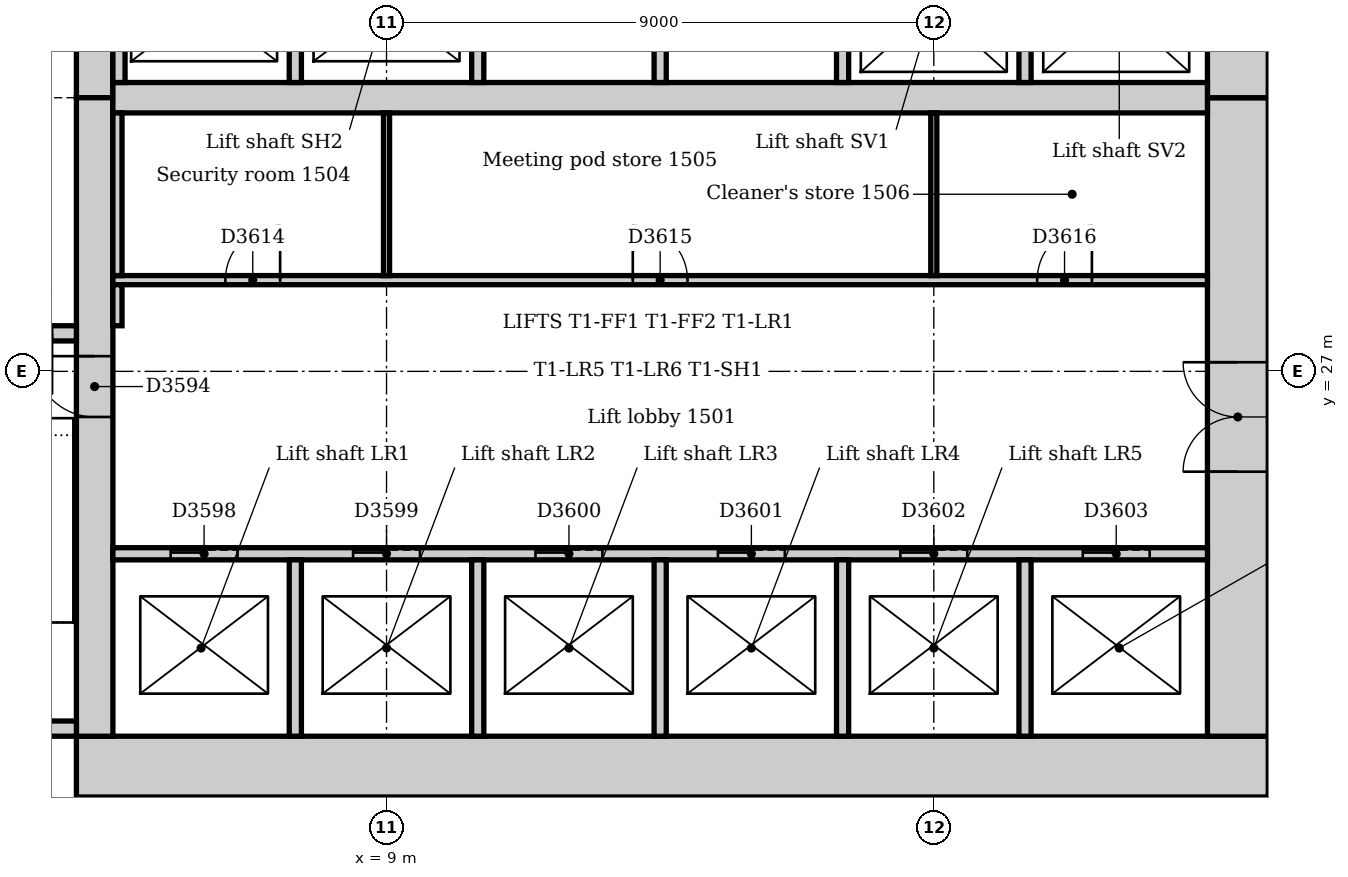
"""IFC4 building model, lengths in metres.
Left out: names, types, materials, properties, quantities, classifications, styles, units other than length and angle.
Written with IfcOpenShell. Run it as: python <this file> out.ifc"""

import sys

from ifc_helpers import new_model, si_unit, direction, frame, frame_2d, origin, place, context, subcontext, project, spatial, rectangle, extrude, element, fill, save


model = new_model("IFC4")
c1 = context("Model", 3, precision=1e-05, world=origin(), true_north=direction((0.0, 1.0)))
c2 = subcontext(c1, "Body", "Model", "MODEL_VIEW")
j1 = project(units=[si_unit("LENGTHUNIT", "METRE"), si_unit("PLANEANGLEUNIT", "RADIAN")], contexts=[c1])
p1 = place(None, origin())
s1 = spatial("IfcSite", under=j1, at=p1, CompositionType="ELEMENT")
p2 = place(p1, origin())
s2 = spatial("IfcBuilding", under=s1, at=p2, CompositionType="ELEMENT")
p3 = place(p2, frame((0.0, 0.0, 67.0)))
s3 = spatial("IfcBuildingStorey", under=s2, at=p3, CompositionType="ELEMENT", Elevation=67.0)
p4 = place(p3, frame((3.9, 20.5, 0.0), z_axis=(0.0, 0.0, 1.0), x_axis=(1.0, 0.0, 0.0)))
e1 = element("IfcWall", 1, at=p4, inside=s3, PredefinedType="SOLIDWALL", context=c2, shape_type="SweptSolid", body=[
    extrude(rectangle(XDim=19.6, YDim=1.0, at=frame_2d((9.8, 0.0))), origin(), (0.0, 0.0, 1.0), 4.0),
])
p5 = place(p3, frame((23.0, 21.0, 0.0), z_axis=(0.0, 0.0, 1.0), x_axis=(0.0, 1.0, 0.0)))
e2 = element("IfcWall", 2, at=p5, inside=s3, PredefinedType="SOLIDWALL", context=c2, shape_type="SweptSolid", body=[
    extrude(rectangle(XDim=10.5, YDim=1.0, at=frame_2d((5.25, 0.0))), origin(), (0.0, 0.0, 1.0), 4.0),
])
p6 = place(p5, frame((4.35, 0.0, 0.0)))
e3 = element("IfcOpeningElement", 3, at=p6, cuts=e2, PredefinedType="OPENING", context=c2, shape_type="SweptSolid", body=[
    extrude(rectangle(XDim=1.8, YDim=2.1, at=frame_2d((0.9, 1.05))), frame((0.0, 0.51, 0.0), z_axis=(0.0, -1.0, 0.0), x_axis=(1.0, 0.0, 0.0)), (0.0, 0.0, 1.0), 1.02),
])
p7 = place(p3, frame((23.0, 31.5, 0.0), z_axis=(0.0, 0.0, 1.0), x_axis=(0.0, 1.0, 0.0)))
e4 = element("IfcWall", 4, at=p7, inside=s3, PredefinedType="SOLIDWALL", context=c2, shape_type="SweptSolid", body=[
    extrude(rectangle(XDim=10.5, YDim=1.0, at=frame_2d((5.25, 0.0))), origin(), (0.0, 0.0, 1.0), 4.0),
])
p8 = place(p7, frame((3.15, 0.0, 0.0)))
e5 = element("IfcOpeningElement", 5, at=p8, cuts=e4, PredefinedType="OPENING", context=c2, shape_type="SweptSolid", body=[
    extrude(rectangle(XDim=1.0, YDim=2.1, at=frame_2d((0.5, 1.05))), frame((0.0, 0.51, 0.0), z_axis=(0.0, -1.0, 0.0), x_axis=(1.0, 0.0, 0.0)), (0.0, 0.0, 1.0), 1.02),
])
p9 = place(p7, frame((5.2, 0.0, 0.0)))
e6 = element("IfcOpeningElement", 6, at=p9, cuts=e4, PredefinedType="OPENING", context=c2, shape_type="SweptSolid", body=[
    extrude(rectangle(XDim=1.0, YDim=2.1, at=frame_2d((0.5, 1.05))), frame((0.0, 0.51, 0.0), z_axis=(0.0, -1.0, 0.0), x_axis=(1.0, 0.0, 0.0)), (0.0, 0.0, 1.0), 1.02),
])
p10 = place(p3, frame((4.2, 42.0, 0.0), z_axis=(0.0, 0.0, 1.0), x_axis=(0.0, -1.0, 0.0)))
e7 = element("IfcWall", 7, at=p10, inside=s3, PredefinedType="SOLIDWALL", context=c2, shape_type="SweptSolid", body=[
    extrude(rectangle(XDim=10.5, YDim=0.6, at=frame_2d((5.25, 0.0))), origin(), (0.0, 0.0, 1.0), 4.0),
])
p11 = place(p10, frame((5.3, 0.0, 0.0)))
e8 = element("IfcOpeningElement", 8, at=p11, cuts=e7, PredefinedType="OPENING", context=c2, shape_type="SweptSolid", body=[
    extrude(rectangle(XDim=1.0, YDim=2.1, at=frame_2d((0.5, 1.05))), frame((0.0, 0.31, 0.0), z_axis=(0.0, -1.0, 0.0), x_axis=(1.0, 0.0, 0.0)), (0.0, 0.0, 1.0), 0.62),
])
p12 = place(p3, frame((4.2, 31.5, 0.0), z_axis=(0.0, 0.0, 1.0), x_axis=(0.0, -1.0, 0.0)))
e9 = element("IfcWall", 9, at=p12, inside=s3, PredefinedType="SOLIDWALL", context=c2, shape_type="SweptSolid", body=[
    extrude(rectangle(XDim=10.5, YDim=0.6, at=frame_2d((5.25, 0.0))), origin(), (0.0, 0.0, 1.0), 4.0),
])
p13 = place(p12, frame((4.25, 0.0, 0.0)))
e10 = element("IfcOpeningElement", 10, at=p13, cuts=e9, PredefinedType="OPENING", context=c2, shape_type="SweptSolid", body=[
    extrude(rectangle(XDim=1.0, YDim=2.1, at=frame_2d((0.5, 1.05))), frame((0.0, 0.31, 0.0), z_axis=(0.0, -1.0, 0.0), x_axis=(1.0, 0.0, 0.0)), (0.0, 0.0, 1.0), 0.62),
])
p14 = place(p3, frame((4.5, 31.5, 0.0), z_axis=(0.0, 0.0, 1.0), x_axis=(1.0, 0.0, 0.0)))
e11 = element("IfcWall", 11, at=p14, inside=s3, PredefinedType="SOLIDWALL", context=c2, shape_type="SweptSolid", body=[
    extrude(rectangle(XDim=18.0, YDim=0.5, at=frame_2d((9.0, 0.0))), origin(), (0.0, 0.0, 1.0), 4.0),
])
p15 = place(p3, frame((0.36, 21.125, 0.0), z_axis=(0.0, 0.0, 1.0), x_axis=(1.0, 0.0, 0.0)))
e12 = element("IfcWall", 12, at=p15, inside=s3, PredefinedType="SOLIDWALL", context=c2, shape_type="SweptSolid", body=[
    extrude(rectangle(XDim=3.54, YDim=0.25, at=frame_2d((1.77, 0.0))), origin(), (0.0, 0.0, 1.0), 4.0),
])
p16 = place(p3, frame((3.9, 27.625, 0.0), z_axis=(0.0, 0.0, 1.0), x_axis=(-1.0, 0.0, 0.0)))
e13 = element("IfcWall", 13, at=p16, inside=s3, PredefinedType="SOLIDWALL", context=c2, shape_type="SweptSolid", body=[
    extrude(rectangle(XDim=3.54, YDim=0.25, at=frame_2d((1.77, 0.0))), origin(), (0.0, 0.0, 1.0), 4.0),
])
p17 = place(p16, frame((0.4, 0.0, 0.0)))
e14 = element("IfcOpeningElement", 14, at=p17, cuts=e13, PredefinedType="OPENING", context=c2, shape_type="SweptSolid", body=[
    extrude(rectangle(XDim=1.0, YDim=2.1, at=frame_2d((0.5, 1.05))), frame((0.0, 0.135, 0.0), z_axis=(0.0, -1.0, 0.0), x_axis=(1.0, 0.0, 0.0)), (0.0, 0.0, 1.0), 0.27),
])
p18 = place(p3, frame((4.5, 24.0, 0.0), z_axis=(0.0, 0.0, 1.0), x_axis=(1.0, 0.0, 0.0)))
e15 = element("IfcWall", 15, at=p18, inside=s3, PredefinedType="PARTITIONING", context=c2, shape_type="SweptSolid", body=[
    extrude(rectangle(XDim=18.0, YDim=0.2, at=frame_2d((9.0, 0.0))), origin(), (0.0, 0.0, 1.0), 3.85),
])
p19 = place(p18, frame((0.95, 0.0, 0.0)))
e16 = element("IfcOpeningElement", 16, at=p19, cuts=e15, PredefinedType="OPENING", context=c2, shape_type="SweptSolid", body=[
    extrude(rectangle(XDim=1.1, YDim=2.1, at=frame_2d((0.55, 1.05))), frame((0.0, 0.11, 0.0), z_axis=(0.0, -1.0, 0.0), x_axis=(1.0, 0.0, 0.0)), (0.0, 0.0, 1.0), 0.22),
])
p20 = place(p18, frame((3.95, 0.0, 0.0)))
e17 = element("IfcOpeningElement", 17, at=p20, cuts=e15, PredefinedType="OPENING", context=c2, shape_type="SweptSolid", body=[
    extrude(rectangle(XDim=1.1, YDim=2.1, at=frame_2d((0.55, 1.05))), frame((0.0, 0.11, 0.0), z_axis=(0.0, -1.0, 0.0), x_axis=(1.0, 0.0, 0.0)), (0.0, 0.0, 1.0), 0.22),
])
p21 = place(p18, frame((6.95, 0.0, 0.0)))
e18 = element("IfcOpeningElement", 18, at=p21, cuts=e15, PredefinedType="OPENING", context=c2, shape_type="SweptSolid", body=[
    extrude(rectangle(XDim=1.1, YDim=2.1, at=frame_2d((0.55, 1.05))), frame((0.0, 0.11, 0.0), z_axis=(0.0, -1.0, 0.0), x_axis=(1.0, 0.0, 0.0)), (0.0, 0.0, 1.0), 0.22),
])
p22 = place(p18, frame((9.95, 0.0, 0.0)))
e19 = element("IfcOpeningElement", 19, at=p22, cuts=e15, PredefinedType="OPENING", context=c2, shape_type="SweptSolid", body=[
    extrude(rectangle(XDim=1.1, YDim=2.1, at=frame_2d((0.55, 1.05))), frame((0.0, 0.11, 0.0), z_axis=(0.0, -1.0, 0.0), x_axis=(1.0, 0.0, 0.0)), (0.0, 0.0, 1.0), 0.22),
])
p23 = place(p18, frame((12.95, 0.0, 0.0)))
e20 = element("IfcOpeningElement", 20, at=p23, cuts=e15, PredefinedType="OPENING", context=c2, shape_type="SweptSolid", body=[
    extrude(rectangle(XDim=1.1, YDim=2.1, at=frame_2d((0.55, 1.05))), frame((0.0, 0.11, 0.0), z_axis=(0.0, -1.0, 0.0), x_axis=(1.0, 0.0, 0.0)), (0.0, 0.0, 1.0), 0.22),
])
p24 = place(p18, frame((15.95, 0.0, 0.0)))
e21 = element("IfcOpeningElement", 21, at=p24, cuts=e15, PredefinedType="OPENING", context=c2, shape_type="SweptSolid", body=[
    extrude(rectangle(XDim=1.1, YDim=2.1, at=frame_2d((0.55, 1.05))), frame((0.0, 0.11, 0.0), z_axis=(0.0, -1.0, 0.0), x_axis=(1.0, 0.0, 0.0)), (0.0, 0.0, 1.0), 0.22),
])
p25 = place(p3, frame((4.6, 31.75, 0.0), z_axis=(0.0, 0.0, 1.0), x_axis=(0.0, 1.0, 0.0)))
e22 = element("IfcWall", 22, at=p25, inside=s3, PredefinedType="PARTITIONING", context=c2, shape_type="SweptSolid", body=[
    extrude(rectangle(XDim=2.65, YDim=0.2, at=frame_2d((1.325, 0.0))), origin(), (0.0, 0.0, 1.0), 3.85),
])
p26 = place(p3, frame((7.5, 21.0, 0.0), z_axis=(0.0, 0.0, 1.0), x_axis=(0.0, 1.0, 0.0)))
e23 = element("IfcWall", 23, at=p26, inside=s3, PredefinedType="PARTITIONING", context=c2, shape_type="SweptSolid", body=[
    extrude(rectangle(XDim=2.9, YDim=0.2, at=frame_2d((1.45, 0.0))), origin(), (0.0, 0.0, 1.0), 3.85),
])
p27 = place(p3, frame((7.5, 31.75, 0.0), z_axis=(0.0, 0.0, 1.0), x_axis=(0.0, 1.0, 0.0)))
e24 = element("IfcWall", 24, at=p27, inside=s3, PredefinedType="PARTITIONING", context=c2, shape_type="SweptSolid", body=[
    extrude(rectangle(XDim=2.65, YDim=0.2, at=frame_2d((1.325, 0.0))), origin(), (0.0, 0.0, 1.0), 3.85),
])
p28 = place(p3, frame((10.5, 21.0, 0.0), z_axis=(0.0, 0.0, 1.0), x_axis=(0.0, 1.0, 0.0)))
e25 = element("IfcWall", 25, at=p28, inside=s3, PredefinedType="PARTITIONING", context=c2, shape_type="SweptSolid", body=[
    extrude(rectangle(XDim=2.9, YDim=0.2, at=frame_2d((1.45, 0.0))), origin(), (0.0, 0.0, 1.0), 3.85),
])
p29 = place(p3, frame((10.5, 31.75, 0.0), z_axis=(0.0, 0.0, 1.0), x_axis=(0.0, 1.0, 0.0)))
e26 = element("IfcWall", 26, at=p29, inside=s3, PredefinedType="PARTITIONING", context=c2, shape_type="SweptSolid", body=[
    extrude(rectangle(XDim=2.65, YDim=0.2, at=frame_2d((1.325, 0.0))), origin(), (0.0, 0.0, 1.0), 3.85),
])
p30 = place(p3, frame((13.5, 21.0, 0.0), z_axis=(0.0, 0.0, 1.0), x_axis=(0.0, 1.0, 0.0)))
e27 = element("IfcWall", 27, at=p30, inside=s3, PredefinedType="PARTITIONING", context=c2, shape_type="SweptSolid", body=[
    extrude(rectangle(XDim=2.9, YDim=0.2, at=frame_2d((1.45, 0.0))), origin(), (0.0, 0.0, 1.0), 3.85),
])
p31 = place(p3, frame((13.5, 31.75, 0.0), z_axis=(0.0, 0.0, 1.0), x_axis=(0.0, 1.0, 0.0)))
e28 = element("IfcWall", 28, at=p31, inside=s3, PredefinedType="PARTITIONING", context=c2, shape_type="SweptSolid", body=[
    extrude(rectangle(XDim=2.65, YDim=0.2, at=frame_2d((1.325, 0.0))), origin(), (0.0, 0.0, 1.0), 3.85),
])
p32 = place(p3, frame((16.5, 21.0, 0.0), z_axis=(0.0, 0.0, 1.0), x_axis=(0.0, 1.0, 0.0)))
e29 = element("IfcWall", 29, at=p32, inside=s3, PredefinedType="PARTITIONING", context=c2, shape_type="SweptSolid", body=[
    extrude(rectangle(XDim=2.9, YDim=0.2, at=frame_2d((1.45, 0.0))), origin(), (0.0, 0.0, 1.0), 3.85),
])
p33 = place(p3, frame((16.5, 31.75, 0.0), z_axis=(0.0, 0.0, 1.0), x_axis=(0.0, 1.0, 0.0)))
e30 = element("IfcWall", 30, at=p33, inside=s3, PredefinedType="PARTITIONING", context=c2, shape_type="SweptSolid", body=[
    extrude(rectangle(XDim=2.65, YDim=0.2, at=frame_2d((1.325, 0.0))), origin(), (0.0, 0.0, 1.0), 3.85),
])
p34 = place(p3, frame((19.5, 21.0, 0.0), z_axis=(0.0, 0.0, 1.0), x_axis=(0.0, 1.0, 0.0)))
e31 = element("IfcWall", 31, at=p34, inside=s3, PredefinedType="PARTITIONING", context=c2, shape_type="SweptSolid", body=[
    extrude(rectangle(XDim=2.9, YDim=0.2, at=frame_2d((1.45, 0.0))), origin(), (0.0, 0.0, 1.0), 3.85),
])
p35 = place(p3, frame((19.5, 31.75, 0.0), z_axis=(0.0, 0.0, 1.0), x_axis=(0.0, 1.0, 0.0)))
e32 = element("IfcWall", 32, at=p35, inside=s3, PredefinedType="PARTITIONING", context=c2, shape_type="SweptSolid", body=[
    extrude(rectangle(XDim=2.65, YDim=0.2, at=frame_2d((1.325, 0.0))), origin(), (0.0, 0.0, 1.0), 3.85),
])
p36 = place(p3, frame((4.5, 28.5, 0.0), z_axis=(0.0, 0.0, 1.0), x_axis=(1.0, 0.0, 0.0)))
e33 = element("IfcWall", 33, at=p36, inside=s3, PredefinedType="PARTITIONING", context=c2, shape_type="SweptSolid", body=[
    extrude(rectangle(XDim=18.0, YDim=0.15, at=frame_2d((9.0, 0.0))), origin(), (0.0, 0.0, 1.0), 3.85),
])
p37 = place(p36, frame((1.85, 0.0, 0.0)))
e34 = element("IfcOpeningElement", 34, at=p37, cuts=e33, PredefinedType="OPENING", context=c2, shape_type="SweptSolid", body=[
    extrude(rectangle(XDim=0.9, YDim=2.1, at=frame_2d((0.45, 1.05))), frame((0.0, 0.085, 0.0), z_axis=(0.0, -1.0, 0.0), x_axis=(1.0, 0.0, 0.0)), (0.0, 0.0, 1.0), 0.17),
])
p38 = place(p36, frame((8.55, 0.0, 0.0)))
e35 = element("IfcOpeningElement", 35, at=p38, cuts=e33, PredefinedType="OPENING", context=c2, shape_type="SweptSolid", body=[
    extrude(rectangle(XDim=0.9, YDim=2.1, at=frame_2d((0.45, 1.05))), frame((0.0, 0.085, 0.0), z_axis=(0.0, -1.0, 0.0), x_axis=(1.0, 0.0, 0.0)), (0.0, 0.0, 1.0), 0.17),
])
p39 = place(p36, frame((15.2, 0.0, 0.0)))
e36 = element("IfcOpeningElement", 36, at=p39, cuts=e33, PredefinedType="OPENING", context=c2, shape_type="SweptSolid", body=[
    extrude(rectangle(XDim=0.9, YDim=2.1, at=frame_2d((0.45, 1.05))), frame((0.0, 0.085, 0.0), z_axis=(0.0, -1.0, 0.0), x_axis=(1.0, 0.0, 0.0)), (0.0, 0.0, 1.0), 0.17),
])
p40 = place(p3, frame((4.575, 27.75, 0.0), z_axis=(0.0, 0.0, 1.0), x_axis=(0.0, 1.0, 0.0)))
e37 = element("IfcWall", 37, at=p40, inside=s3, PredefinedType="PARTITIONING", context=c2, shape_type="SweptSolid", body=[
    extrude(rectangle(XDim=0.675, YDim=0.15, at=frame_2d((0.338, 0.0))), origin(), (0.0, 0.0, 1.0), 3.85),
])
p41 = place(p3, frame((4.575, 28.575, 0.0), z_axis=(0.0, 0.0, 1.0), x_axis=(0.0, 1.0, 0.0)))
e38 = element("IfcWall", 38, at=p41, inside=s3, PredefinedType="PARTITIONING", context=c2, shape_type="SweptSolid", body=[
    extrude(rectangle(XDim=2.675, YDim=0.15, at=frame_2d((1.337, 0.0))), origin(), (0.0, 0.0, 1.0), 3.85),
])
for number, where, z_axis, x_axis in (
    (39, (9.0, 28.575, 0.0), (0.0, 0.0, 1.0), (0.0, 1.0, 0.0)),
    (40, (18.0, 28.575, 0.0), (0.0, 0.0, 1.0), (0.0, 1.0, 0.0)),
):
    element("IfcWall", number, at=place(p3, frame(where, z_axis=z_axis, x_axis=x_axis)), inside=s3, PredefinedType="PARTITIONING", context=c2, shape_type="SweptSolid", body=[
        extrude(rectangle(XDim=2.675, YDim=0.1, at=frame_2d((1.337, 0.0))), origin(), (0.0, 0.0, 1.0), 3.85),
    ])
p42 = place(p13, frame((1.0, 0.0, 0.0), z_axis=(0.0, 0.0, 1.0), x_axis=(-1.0, 0.0, 0.0)))
e41 = element("IfcDoor", 41, at=p42, inside=s3, OperationType="SINGLE_SWING_RIGHT", PredefinedType="DOOR", context=c2, shape_type="SweptSolid", body=[
    extrude(rectangle(XDim=1.0, YDim=2.1, at=frame_2d((0.5, 1.05))), frame((0.0, 0.025, 0.0), z_axis=(0.0, -1.0, 0.0), x_axis=(1.0, 0.0, 0.0)), (0.0, 0.0, 1.0), 0.05),
])
fill(e10, e41)
p43 = place(p19, origin())
e42 = element("IfcDoor", 42, at=p43, inside=s3, OperationType="SLIDING_TO_LEFT", PredefinedType="DOOR", context=c2, shape_type="SweptSolid", body=[
    extrude(rectangle(XDim=1.1, YDim=2.1, at=frame_2d((0.55, 1.05))), frame((0.0, 0.025, 0.0), z_axis=(0.0, -1.0, 0.0), x_axis=(1.0, 0.0, 0.0)), (0.0, 0.0, 1.0), 0.05),
])
fill(e16, e42)
p44 = place(p20, origin())
e43 = element("IfcDoor", 43, at=p44, inside=s3, OperationType="SLIDING_TO_LEFT", PredefinedType="DOOR", context=c2, shape_type="SweptSolid", body=[
    extrude(rectangle(XDim=1.1, YDim=2.1, at=frame_2d((0.55, 1.05))), frame((0.0, 0.025, 0.0), z_axis=(0.0, -1.0, 0.0), x_axis=(1.0, 0.0, 0.0)), (0.0, 0.0, 1.0), 0.05),
])
fill(e17, e43)
p45 = place(p21, origin())
e44 = element("IfcDoor", 44, at=p45, inside=s3, OperationType="SLIDING_TO_LEFT", PredefinedType="DOOR", context=c2, shape_type="SweptSolid", body=[
    extrude(rectangle(XDim=1.1, YDim=2.1, at=frame_2d((0.55, 1.05))), frame((0.0, 0.025, 0.0), z_axis=(0.0, -1.0, 0.0), x_axis=(1.0, 0.0, 0.0)), (0.0, 0.0, 1.0), 0.05),
])
fill(e18, e44)
p46 = place(p22, origin())
e45 = element("IfcDoor", 45, at=p46, inside=s3, OperationType="SLIDING_TO_LEFT", PredefinedType="DOOR", context=c2, shape_type="SweptSolid", body=[
    extrude(rectangle(XDim=1.1, YDim=2.1, at=frame_2d((0.55, 1.05))), frame((0.0, 0.025, 0.0), z_axis=(0.0, -1.0, 0.0), x_axis=(1.0, 0.0, 0.0)), (0.0, 0.0, 1.0), 0.05),
])
fill(e19, e45)
p47 = place(p23, origin())
e46 = element("IfcDoor", 46, at=p47, inside=s3, OperationType="SLIDING_TO_LEFT", PredefinedType="DOOR", context=c2, shape_type="SweptSolid", body=[
    extrude(rectangle(XDim=1.1, YDim=2.1, at=frame_2d((0.55, 1.05))), frame((0.0, 0.025, 0.0), z_axis=(0.0, -1.0, 0.0), x_axis=(1.0, 0.0, 0.0)), (0.0, 0.0, 1.0), 0.05),
])
fill(e20, e46)
p48 = place(p24, origin())
e47 = element("IfcDoor", 47, at=p48, inside=s3, OperationType="SLIDING_TO_LEFT", PredefinedType="DOOR", context=c2, shape_type="SweptSolid", body=[
    extrude(rectangle(XDim=1.1, YDim=2.1, at=frame_2d((0.55, 1.05))), frame((0.0, 0.025, 0.0), z_axis=(0.0, -1.0, 0.0), x_axis=(1.0, 0.0, 0.0)), (0.0, 0.0, 1.0), 0.05),
])
fill(e21, e47)
p49 = place(p6, origin())
e48 = element("IfcDoor", 48, at=p49, inside=s3, OperationType="DOUBLE_DOOR_DOUBLE_SWING", PredefinedType="DOOR", context=c2, shape_type="SweptSolid", body=[
    extrude(rectangle(XDim=1.8, YDim=2.1, at=frame_2d((0.9, 1.05))), frame((0.0, 0.025, 0.0), z_axis=(0.0, -1.0, 0.0), x_axis=(1.0, 0.0, 0.0)), (0.0, 0.0, 1.0), 0.05),
])
fill(e3, e48)
p50 = place(p37, origin())
e49 = element("IfcDoor", 49, at=p50, inside=s3, OperationType="SINGLE_SWING_RIGHT", PredefinedType="DOOR", context=c2, shape_type="SweptSolid", body=[
    extrude(rectangle(XDim=0.9, YDim=2.1, at=frame_2d((0.45, 1.05))), frame((0.0, 0.025, 0.0), z_axis=(0.0, -1.0, 0.0), x_axis=(1.0, 0.0, 0.0)), (0.0, 0.0, 1.0), 0.05),
])
fill(e34, e49)
p51 = place(p38, origin())
e50 = element("IfcDoor", 50, at=p51, inside=s3, OperationType="SINGLE_SWING_LEFT", PredefinedType="DOOR", context=c2, shape_type="SweptSolid", body=[
    extrude(rectangle(XDim=0.9, YDim=2.1, at=frame_2d((0.45, 1.05))), frame((0.0, 0.025, 0.0), z_axis=(0.0, -1.0, 0.0), x_axis=(1.0, 0.0, 0.0)), (0.0, 0.0, 1.0), 0.05),
])
fill(e35, e50)
p52 = place(p39, origin())
e51 = element("IfcDoor", 51, at=p52, inside=s3, OperationType="SINGLE_SWING_RIGHT", PredefinedType="DOOR", context=c2, shape_type="SweptSolid", body=[
    extrude(rectangle(XDim=0.9, YDim=2.1, at=frame_2d((0.45, 1.05))), frame((0.0, 0.025, 0.0), z_axis=(0.0, -1.0, 0.0), x_axis=(1.0, 0.0, 0.0)), (0.0, 0.0, 1.0), 0.05),
])
fill(e36, e51)
save(model, sys.argv[1])
